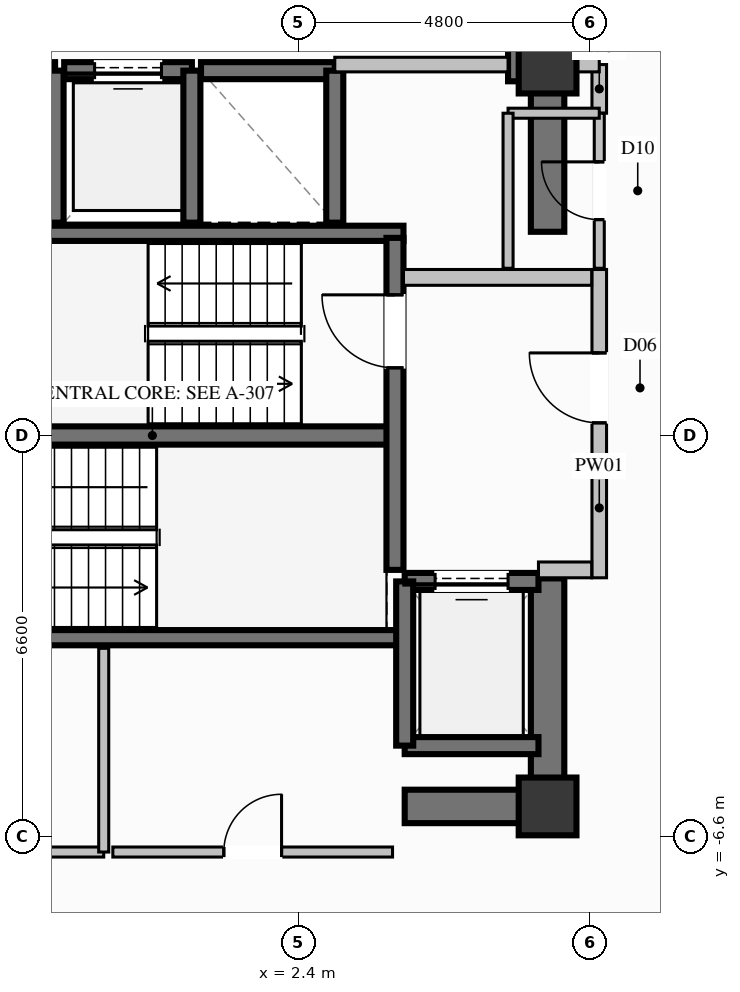
"""IFC4 building model, lengths in metres.
Left out: names, types, materials, properties, quantities, classifications, styles, units other than length and angle.
Written with IfcOpenShell. Run it as: python <this file> out.ifc"""

import sys

from ifc_helpers import new_model, si_unit, direction, frame, frame_2d, origin, origin_2d, place, context, subcontext, project, spatial, rectangle, extrude, element, fill, save


model = new_model("IFC4")
c1 = context("Model", 3, precision=1e-05, world=origin(), true_north=direction((0.0, 1.0)))
c2 = subcontext(c1, "Body", "Model", "MODEL_VIEW")
j1 = project(units=[si_unit("LENGTHUNIT", "METRE"), si_unit("PLANEANGLEUNIT", "RADIAN")], contexts=[c1])
p1 = place(None, origin())
s1 = spatial("IfcSite", under=j1, at=p1, CompositionType="ELEMENT")
p2 = place(p1, origin())
s2 = spatial("IfcBuilding", under=s1, at=p2, CompositionType="ELEMENT")
p3 = place(p2, frame((0.0, 0.0, 173.2)))
s3 = spatial("IfcBuildingStorey", under=s2, at=p3, CompositionType="ELEMENT", Elevation=173.2)
for number, where, z_axis, x_axis in (
    (1, (6.5, -6.1, 0.0), (0.0, 0.0, 1.0), (1.0, 0.0, 0.0)),
    (2, (6.5, 6.1, 0.0), (0.0, 0.0, 1.0), (1.0, 0.0, 0.0)),
):
    element("IfcColumn", number, at=place(p3, frame(where, z_axis=z_axis, x_axis=x_axis)), inside=s3, PredefinedType="COLUMN", context=c2, shape_type="SweptSolid", body=[
        extrude(rectangle(XDim=0.95, YDim=0.95, at=origin_2d()), origin(), (0.0, 0.0, 1.0), 3.6),
    ])
p4 = place(p3, frame((-3.99, 0.0, 0.0), z_axis=(0.0, 0.0, 1.0), x_axis=(1.0, 0.0, 0.0)))
e3 = element("IfcWall", 3, at=p4, inside=s3, PredefinedType="SHEAR", context=c2, shape_type="SweptSolid", body=[
    extrude(rectangle(XDim=7.98, YDim=0.3, at=frame_2d((3.99, 0.0))), origin(), (0.0, 0.0, 1.0), 3.6),
])
for number, where, z_axis, x_axis in (
    (4, (-4.13, -3.325, 0.0), (0.0, 0.0, 1.0), (1.0, 0.0, 0.0)),
    (5, (-4.13, 3.325, 0.0), (0.0, 0.0, 1.0), (1.0, 0.0, 0.0)),
):
    element("IfcWall", number, at=place(p3, frame(where, z_axis=z_axis, x_axis=x_axis)), inside=s3, PredefinedType="SOLIDWALL", context=c2, shape_type="SweptSolid", body=[
        extrude(rectangle(XDim=8.26, YDim=0.25, at=frame_2d((4.13, 0.0))), origin(), (0.0, 0.0, 1.0), 3.6),
    ])
p5 = place(p3, frame((4.15, -6.1, 0.0), z_axis=(0.0, 0.0, 1.0), x_axis=(1.0, 0.0, 0.0)))
e6 = element("IfcWall", 6, at=p5, inside=s3, PredefinedType="SHEAR", context=c2, shape_type="SweptSolid", body=[
    extrude(rectangle(XDim=2.075, YDim=0.55, at=frame_2d((1.038, 0.0))), origin(), (0.0, 0.0, 1.0), 3.6),
])
p6 = place(p3, frame((5.85, 6.1, 0.0), z_axis=(0.0, 0.0, 1.0), x_axis=(1.0, 0.0, 0.0)))
e7 = element("IfcWall", 7, at=p6, inside=s3, PredefinedType="SHEAR", context=c2, shape_type="SweptSolid", body=[
    extrude(rectangle(XDim=0.375, YDim=0.55, at=frame_2d((0.188, 0.0))), origin(), (0.0, 0.0, 1.0), 3.6),
])
p7 = place(p3, frame((6.5, -6.375, 0.0), z_axis=(0.0, 0.0, 1.0), x_axis=(0.0, 1.0, 0.0)))
e8 = element("IfcWall", 8, at=p7, inside=s3, PredefinedType="SHEAR", context=c2, shape_type="SweptSolid", body=[
    extrude(rectangle(XDim=4.025, YDim=0.55, at=frame_2d((2.012, 0.0))), origin(), (0.0, 0.0, 1.0), 3.6),
])
p8 = place(p3, frame((6.5, 3.35, 0.0), z_axis=(0.0, 0.0, 1.0), x_axis=(0.0, 1.0, 0.0)))
e9 = element("IfcWall", 9, at=p8, inside=s3, PredefinedType="SHEAR", context=c2, shape_type="SweptSolid", body=[
    extrude(rectangle(XDim=3.025, YDim=0.55, at=frame_2d((1.512, 0.0))), origin(), (0.0, 0.0, 1.0), 3.6),
])
p9 = place(p3, frame((-1.6, 6.0, 0.0), z_axis=(0.0, 0.0, 1.0), x_axis=(-1.0, 0.0, 0.0)))
e10 = element("IfcWall", 10, at=p9, inside=s3, PredefinedType="SOLIDWALL", context=c2, shape_type="SweptSolid", body=[
    extrude(rectangle(XDim=2.1, YDim=0.28, at=frame_2d((1.05, 0.0))), origin(), (0.0, 0.0, 1.0), 3.36),
])
p10 = place(p9, frame((0.5, 0.0, 0.0)))
e11 = element("IfcOpeningElement", 11, at=p10, cuts=e10, PredefinedType="OPENING", context=c2, shape_type="SweptSolid", body=[
    extrude(rectangle(XDim=1.1, YDim=2.2, at=frame_2d((0.55, 1.1))), frame((0.0, 0.15, 0.0), z_axis=(0.0, -1.0, 0.0), x_axis=(1.0, 0.0, 0.0)), (0.0, 0.0, 1.0), 0.3),
])
p11 = place(p3, frame((-1.6, 3.5, 0.0), z_axis=(0.0, 0.0, 1.0), x_axis=(0.0, 1.0, 0.0)))
e12 = element("IfcWall", 12, at=p11, inside=s3, PredefinedType="SOLIDWALL", context=c2, shape_type="SweptSolid", body=[
    extrude(rectangle(XDim=2.5, YDim=0.28, at=frame_2d((1.25, 0.0))), origin(), (0.0, 0.0, 1.0), 3.36),
])
p12 = place(p3, frame((0.65, 6.0, 0.0), z_axis=(0.0, 0.0, 1.0), x_axis=(-1.0, 0.0, 0.0)))
e13 = element("IfcWall", 13, at=p12, inside=s3, PredefinedType="SOLIDWALL", context=c2, shape_type="SweptSolid", body=[
    extrude(rectangle(XDim=2.1, YDim=0.28, at=frame_2d((1.05, 0.0))), origin(), (0.0, 0.0, 1.0), 3.36),
])
p13 = place(p12, frame((0.5, 0.0, 0.0)))
e14 = element("IfcOpeningElement", 14, at=p13, cuts=e13, PredefinedType="OPENING", context=c2, shape_type="SweptSolid", body=[
    extrude(rectangle(XDim=1.1, YDim=2.2, at=frame_2d((0.55, 1.1))), frame((0.0, 0.15, 0.0), z_axis=(0.0, -1.0, 0.0), x_axis=(1.0, 0.0, 0.0)), (0.0, 0.0, 1.0), 0.3),
])
p14 = place(p3, frame((0.65, 3.5, 0.0), z_axis=(0.0, 0.0, 1.0), x_axis=(0.0, 1.0, 0.0)))
e15 = element("IfcWall", 15, at=p14, inside=s3, PredefinedType="SOLIDWALL", context=c2, shape_type="SweptSolid", body=[
    extrude(rectangle(XDim=2.5, YDim=0.28, at=frame_2d((1.25, 0.0))), origin(), (0.0, 0.0, 1.0), 3.36),
])
p15 = place(p3, frame((3.0, 6.0, 0.0), z_axis=(0.0, 0.0, 1.0), x_axis=(-1.0, 0.0, 0.0)))
e16 = element("IfcWall", 16, at=p15, inside=s3, PredefinedType="SOLIDWALL", context=c2, shape_type="SweptSolid", body=[
    extrude(rectangle(XDim=2.2, YDim=0.28, at=frame_2d((1.1, 0.0))), origin(), (0.0, 0.0, 1.0), 3.36),
])
p16 = place(p3, frame((3.0, 3.5, 0.0), z_axis=(0.0, 0.0, 1.0), x_axis=(0.0, 1.0, 0.0)))
e17 = element("IfcWall", 17, at=p16, inside=s3, PredefinedType="SOLIDWALL", context=c2, shape_type="SweptSolid", body=[
    extrude(rectangle(XDim=2.5, YDim=0.28, at=frame_2d((1.25, 0.0))), origin(), (0.0, 0.0, 1.0), 3.36),
])
p17 = place(p3, frame((4.15, -5.1, 0.0), z_axis=(0.0, 0.0, 1.0), x_axis=(1.0, 0.0, 0.0)))
e18 = element("IfcWall", 18, at=p17, inside=s3, PredefinedType="SOLIDWALL", context=c2, shape_type="SweptSolid", body=[
    extrude(rectangle(XDim=2.2, YDim=0.28, at=frame_2d((1.1, 0.0))), origin(), (0.0, 0.0, 1.0), 3.36),
])
p18 = place(p3, frame((6.35, -2.4, 0.0), z_axis=(0.0, 0.0, 1.0), x_axis=(-1.0, 0.0, 0.0)))
e19 = element("IfcWall", 19, at=p18, inside=s3, PredefinedType="SOLIDWALL", context=c2, shape_type="SweptSolid", body=[
    extrude(rectangle(XDim=2.2, YDim=0.28, at=frame_2d((1.1, 0.0))), origin(), (0.0, 0.0, 1.0), 3.36),
])
p19 = place(p18, frame((0.5, 0.0, 0.0)))
e20 = element("IfcOpeningElement", 20, at=p19, cuts=e19, PredefinedType="OPENING", context=c2, shape_type="SweptSolid", body=[
    extrude(rectangle(XDim=1.2, YDim=2.2, at=frame_2d((0.6, 1.1))), frame((0.0, 0.15, 0.0), z_axis=(0.0, -1.0, 0.0), x_axis=(1.0, 0.0, 0.0)), (0.0, 0.0, 1.0), 0.3),
])
p20 = place(p3, frame((4.15, -2.4, 0.0), z_axis=(0.0, 0.0, 1.0), x_axis=(0.0, -1.0, 0.0)))
e21 = element("IfcWall", 21, at=p20, inside=s3, PredefinedType="SOLIDWALL", context=c2, shape_type="SweptSolid", body=[
    extrude(rectangle(XDim=2.7, YDim=0.28, at=frame_2d((1.35, 0.0))), origin(), (0.0, 0.0, 1.0), 3.36),
])
p21 = place(p3, frame((3.99, -2.21, 0.0), z_axis=(0.0, 0.0, 1.0), x_axis=(0.0, 1.0, 0.0)))
e22 = element("IfcWall", 22, at=p21, inside=s3, PredefinedType="SOLIDWALL", context=c2, shape_type="SweptSolid", body=[
    extrude(rectangle(XDim=5.46, YDim=0.28, at=frame_2d((2.73, 0.0))), origin(), (0.0, 0.0, 1.0), 3.36),
])
p22 = place(p21, frame((3.323, 0.0, 0.0)))
e23 = element("IfcOpeningElement", 23, at=p22, cuts=e22, PredefinedType="OPENING", context=c2, shape_type="SweptSolid", body=[
    extrude(rectangle(XDim=1.2, YDim=2.2, at=frame_2d((0.6, 1.1))), frame((0.0, 0.15, 0.0), z_axis=(0.0, -1.0, 0.0), x_axis=(1.0, 0.0, 0.0)), (0.0, 0.0, 1.0), 0.3),
])
p23 = place(p3, frame((7.35, -2.34, 0.0), z_axis=(0.0, 0.0, 1.0), x_axis=(0.0, 1.0, 0.0)))
e24 = element("IfcWall", 24, at=p23, inside=s3, PredefinedType="PARTITIONING", context=c2, shape_type="SweptSolid", body=[
    extrude(rectangle(XDim=5.07, YDim=0.24, at=frame_2d((2.535, 0.0))), origin(), (0.0, 0.0, 1.0), 2.445),
])
p24 = place(p23, frame((2.548, 0.0, 0.0)))
e25 = element("IfcOpeningElement", 25, at=p24, cuts=e24, PredefinedType="OPENING", context=c2, shape_type="SweptSolid", body=[
    extrude(rectangle(XDim=1.15, YDim=2.2, at=frame_2d((0.575, 1.1))), frame((0.0, 0.13, 0.0), z_axis=(0.0, -1.0, 0.0), x_axis=(1.0, 0.0, 0.0)), (0.0, 0.0, 1.0), 0.26),
])
p25 = place(p3, frame((6.35, -2.21, 0.0), z_axis=(0.0, 0.0, 1.0), x_axis=(1.0, 0.0, 0.0)))
e26 = element("IfcWall", 26, at=p25, inside=s3, PredefinedType="PARTITIONING", context=c2, shape_type="SweptSolid", body=[
    extrude(rectangle(XDim=0.875, YDim=0.26, at=frame_2d((0.438, 0.0))), origin(), (0.0, 0.0, 1.0), 3.36),
])
p26 = place(p3, frame((4.13, 2.6, 0.0), z_axis=(0.0, 0.0, 1.0), x_axis=(1.0, 0.0, 0.0)))
e27 = element("IfcWall", 27, at=p26, inside=s3, PredefinedType="PARTITIONING", context=c2, shape_type="SweptSolid", body=[
    extrude(rectangle(XDim=3.095, YDim=0.26, at=frame_2d((1.548, 0.0))), origin(), (0.0, 0.0, 1.0), 3.36),
])
p27 = place(p3, frame((3.0, 6.1, 0.0), z_axis=(0.0, 0.0, 1.0), x_axis=(1.0, 0.0, 0.0)))
e28 = element("IfcWall", 28, at=p27, inside=s3, PredefinedType="PARTITIONING", context=c2, shape_type="SweptSolid", body=[
    extrude(rectangle(XDim=2.85, YDim=0.24, at=frame_2d((1.425, 0.0))), origin(), (0.0, 0.0, 1.0), 2.445),
])
p28 = place(p3, frame((7.35, 5.3, 0.0), z_axis=(0.0, 0.0, 1.0), x_axis=(0.0, 1.0, 0.0)))
e29 = element("IfcWall", 29, at=p28, inside=s3, PredefinedType="PARTITIONING", context=c2, shape_type="SweptSolid", body=[
    extrude(rectangle(XDim=0.8, YDim=0.24, at=frame_2d((0.4, 0.0))), origin(), (0.0, 0.0, 1.0), 2.445),
])
p29 = place(p3, frame((6.5, 6.1, 0.0), z_axis=(0.0, 0.0, 1.0), x_axis=(1.0, 0.0, 0.0)))
e30 = element("IfcWall", 30, at=p29, inside=s3, PredefinedType="PARTITIONING", context=c2, shape_type="SweptSolid", body=[
    extrude(rectangle(XDim=0.85, YDim=0.24, at=frame_2d((0.425, 0.0))), origin(), (0.0, 0.0, 1.0), 2.801),
])
p30 = place(p3, frame((7.35, 2.75, 0.0), z_axis=(0.0, 0.0, 1.0), x_axis=(0.0, 1.0, 0.0)))
e31 = element("IfcWall", 31, at=p30, inside=s3, PredefinedType="PARTITIONING", context=c2, shape_type="SweptSolid", body=[
    extrude(rectangle(XDim=2.55, YDim=0.165, at=frame_2d((1.275, 0.0))), origin(), (0.0, 0.0, 1.0), 3.36),
])
p31 = place(p30, frame((0.8, 0.0, 0.0)))
e32 = element("IfcOpeningElement", 32, at=p31, cuts=e31, PredefinedType="OPENING", context=c2, shape_type="SweptSolid", body=[
    extrude(rectangle(XDim=0.95, YDim=2.1, at=frame_2d((0.475, 1.05))), frame((0.0, 0.093, 0.0), z_axis=(0.0, -1.0, 0.0), x_axis=(1.0, 0.0, 0.0)), (0.0, 0.0, 1.0), 0.185),
])
p32 = place(p3, frame((7.35, 5.3, 0.0), z_axis=(0.0, 0.0, 1.0), x_axis=(-1.0, 0.0, 0.0)))
e33 = element("IfcWall", 33, at=p32, inside=s3, PredefinedType="PARTITIONING", context=c2, shape_type="SweptSolid", body=[
    extrude(rectangle(XDim=1.5, YDim=0.165, at=frame_2d((0.75, 0.0))), origin(), (0.0, 0.0, 1.0), 2.445),
])
p33 = place(p3, frame((5.85, 5.3, 0.0), z_axis=(0.0, 0.0, 1.0), x_axis=(0.0, -1.0, 0.0)))
e34 = element("IfcWall", 34, at=p33, inside=s3, PredefinedType="PARTITIONING", context=c2, shape_type="SweptSolid", body=[
    extrude(rectangle(XDim=2.55, YDim=0.165, at=frame_2d((1.275, 0.0))), origin(), (0.0, 0.0, 1.0), 2.445),
])
p34 = place(p3, frame((-5.7, -6.85, 0.0), z_axis=(0.0, 0.0, 1.0), x_axis=(1.0, 0.0, 0.0)))
e35 = element("IfcWall", 35, at=p34, inside=s3, PredefinedType="PARTITIONING", context=c2, shape_type="SweptSolid", body=[
    extrude(rectangle(XDim=4.9, YDim=0.165, at=frame_2d((2.45, 0.0))), origin(), (0.0, 0.0, 1.0), 2.445),
])
p35 = place(p34, frame((1.975, 0.0, 0.0)))
e36 = element("IfcOpeningElement", 36, at=p35, cuts=e35, PredefinedType="OPENING", context=c2, shape_type="SweptSolid", body=[
    extrude(rectangle(XDim=0.95, YDim=2.1, at=frame_2d((0.475, 1.05))), frame((0.0, 0.093, 0.0), z_axis=(0.0, -1.0, 0.0), x_axis=(1.0, 0.0, 0.0)), (0.0, 0.0, 1.0), 0.185),
])
p36 = place(p3, frame((-0.8, -6.85, 0.0), z_axis=(0.0, 0.0, 1.0), x_axis=(0.0, 1.0, 0.0)))
e37 = element("IfcWall", 37, at=p36, inside=s3, PredefinedType="PARTITIONING", context=c2, shape_type="SweptSolid", body=[
    extrude(rectangle(XDim=3.35, YDim=0.165, at=frame_2d((1.675, 0.0))), origin(), (0.0, 0.0, 1.0), 3.36),
])
p37 = place(p3, frame((-0.65, -6.85, 0.0), z_axis=(0.0, 0.0, 1.0), x_axis=(1.0, 0.0, 0.0)))
e38 = element("IfcWall", 38, at=p37, inside=s3, PredefinedType="PARTITIONING", context=c2, shape_type="SweptSolid", body=[
    extrude(rectangle(XDim=4.6, YDim=0.165, at=frame_2d((2.3, 0.0))), origin(), (0.0, 0.0, 1.0), 2.445),
])
p38 = place(p37, frame((1.825, 0.0, 0.0)))
e39 = element("IfcOpeningElement", 39, at=p38, cuts=e38, PredefinedType="OPENING", context=c2, shape_type="SweptSolid", body=[
    extrude(rectangle(XDim=0.95, YDim=2.1, at=frame_2d((0.475, 1.05))), frame((0.0, 0.093, 0.0), z_axis=(0.0, -1.0, 0.0), x_axis=(1.0, 0.0, 0.0)), (0.0, 0.0, 1.0), 0.185),
])
p39 = place(p3, frame((7.35, 8.65, 0.0), z_axis=(0.0, 0.0, 1.0), x_axis=(0.846409267484, -0.532532958526, 0.0)))
e40 = element("IfcWall", 40, at=p39, inside=s3, PredefinedType="PARTITIONING", context=c2, shape_type="SweptSolid", body=[
    extrude(rectangle(XDim=4.413, YDim=0.24, at=frame_2d((2.206, 0.0))), origin(), (0.0, 0.0, 1.0), 3.36),
])
p40 = place(p39, frame((1.706, 0.0, 0.0)))
e41 = element("IfcOpeningElement", 41, at=p40, cuts=e40, PredefinedType="OPENING", context=c2, shape_type="SweptSolid", body=[
    extrude(rectangle(XDim=1.0, YDim=2.2, at=frame_2d((0.5, 1.1))), frame((0.0, 0.13, 0.0), z_axis=(0.0, -1.0, 0.0), x_axis=(1.0, 0.0, 0.0)), (0.0, 0.0, 1.0), 0.26),
])
p41 = place(p13, origin())
e42 = element("IfcDoor", 42, at=p41, inside=s3, OperationType="SLIDING_TO_LEFT", PredefinedType="DOOR", context=c2, shape_type="SweptSolid", body=[
    extrude(rectangle(XDim=1.1, YDim=2.2, at=frame_2d((0.55, 1.1))), frame((0.0, 0.025, 0.0), z_axis=(0.0, -1.0, 0.0), x_axis=(1.0, 0.0, 0.0)), (0.0, 0.0, 1.0), 0.05),
])
fill(e14, e42)
p42 = place(p19, origin())
e43 = element("IfcDoor", 43, at=p42, inside=s3, OperationType="SLIDING_TO_LEFT", PredefinedType="DOOR", context=c2, shape_type="SweptSolid", body=[
    extrude(rectangle(XDim=1.2, YDim=2.2, at=frame_2d((0.6, 1.1))), frame((0.0, 0.025, 0.0), z_axis=(0.0, -1.0, 0.0), x_axis=(1.0, 0.0, 0.0)), (0.0, 0.0, 1.0), 0.05),
])
fill(e20, e43)
p43 = place(p22, origin())
e44 = element("IfcDoor", 44, at=p43, inside=s3, OperationType="SINGLE_SWING_RIGHT", PredefinedType="DOOR", context=c2, shape_type="SweptSolid", body=[
    extrude(rectangle(XDim=1.2, YDim=2.2, at=frame_2d((0.6, 1.1))), frame((0.0, 0.025, 0.0), z_axis=(0.0, -1.0, 0.0), x_axis=(1.0, 0.0, 0.0)), (0.0, 0.0, 1.0), 0.05),
])
fill(e23, e44)
p44 = place(p24, origin())
e45 = element("IfcDoor", 45, at=p44, inside=s3, OperationType="SINGLE_SWING_RIGHT", PredefinedType="DOOR", context=c2, shape_type="SweptSolid", body=[
    extrude(rectangle(XDim=1.15, YDim=2.2, at=frame_2d((0.575, 1.1))), frame((0.0, 0.025, 0.0), z_axis=(0.0, -1.0, 0.0), x_axis=(1.0, 0.0, 0.0)), (0.0, 0.0, 1.0), 0.05),
])
fill(e25, e45)
p45 = place(p31, origin())
e46 = element("IfcDoor", 46, at=p45, inside=s3, OperationType="SINGLE_SWING_RIGHT", PredefinedType="DOOR", context=c2, shape_type="SweptSolid", body=[
    extrude(rectangle(XDim=0.95, YDim=2.1, at=frame_2d((0.475, 1.05))), frame((0.0, 0.025, 0.0), z_axis=(0.0, -1.0, 0.0), x_axis=(1.0, 0.0, 0.0)), (0.0, 0.0, 1.0), 0.05),
])
fill(e32, e46)
p46 = place(p38, origin())
e47 = element("IfcDoor", 47, at=p46, inside=s3, OperationType="SINGLE_SWING_RIGHT", PredefinedType="DOOR", context=c2, shape_type="SweptSolid", body=[
    extrude(rectangle(XDim=0.95, YDim=2.1, at=frame_2d((0.475, 1.05))), frame((0.0, 0.025, 0.0), z_axis=(0.0, -1.0, 0.0), x_axis=(1.0, 0.0, 0.0)), (0.0, 0.0, 1.0), 0.05),
])
fill(e39, e47)
save(model, sys.argv[1])
